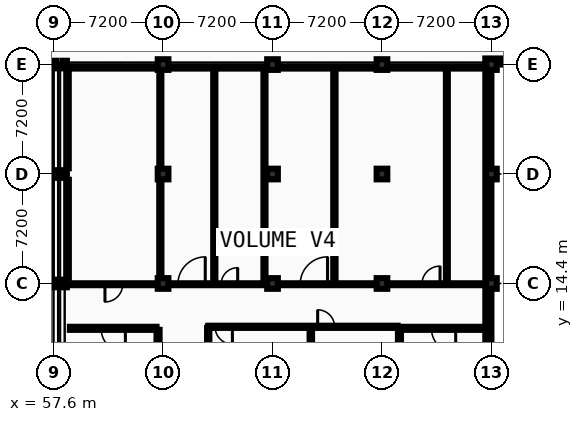
"""IFC4 building model, lengths in metres.
Left out: names, types, materials, properties, quantities, classifications, styles, units other than length and angle.
Written with IfcOpenShell. Run it as: python <this file> out.ifc"""

import sys

from ifc_helpers import new_model, si_unit, direction, frame, frame_2d, origin, origin_2d, place, context, subcontext, project, spatial, rectangle, i_section, extrude, element, fill, save


model = new_model("IFC4")
c1 = context("Model", 3, precision=1e-05, world=origin(), true_north=direction((0.0, 1.0)))
c2 = subcontext(c1, "Body", "Model", "MODEL_VIEW")
j1 = project(units=[si_unit("LENGTHUNIT", "METRE"), si_unit("PLANEANGLEUNIT", "RADIAN")], contexts=[c1])
p1 = place(None, origin())
s1 = spatial("IfcSite", under=j1, at=p1, CompositionType="ELEMENT")
p2 = place(p1, origin())
s2 = spatial("IfcBuilding", under=s1, at=p2, CompositionType="ELEMENT")
p3 = place(p2, frame((0.0, 0.0, -4.8)))
s3 = spatial("IfcBuildingStorey", under=s2, at=p3, CompositionType="ELEMENT", Elevation=-4.8)
for number, where, z_axis, x_axis in (
    (1, (57.6, 14.4, 0.0), (0.0, 0.0, 1.0), (1.0, 0.0, 0.0)),
    (2, (57.6, 21.6, 0.0), (0.0, 0.0, 1.0), (1.0, 0.0, 0.0)),
    (3, (57.6, 28.8, 0.0), (0.0, 0.0, 1.0), (1.0, 0.0, 0.0)),
    (4, (58.32, 14.4, 0.0), (0.0, 0.0, 1.0), (1.0, 0.0, 0.0)),
    (5, (58.32, 21.6, 0.0), (0.0, 0.0, 1.0), (1.0, 0.0, 0.0)),
    (6, (58.32, 28.8, 0.0), (0.0, 0.0, 1.0), (1.0, 0.0, 0.0)),
):
    element("IfcColumn", number, at=place(p3, frame(where, z_axis=z_axis, x_axis=x_axis)), inside=s3, PredefinedType="COLUMN", context=c2, shape_type="SweptSolid", body=[
        extrude(i_section(OverallWidth=0.3, OverallDepth=0.5, WebThickness=0.014, FlangeThickness=0.028, FilletRadius=0.027, at=origin_2d()), origin(), (0.0, 0.0, 1.0), 4.8),
    ])
for number, where, z_axis, x_axis in (
    (7, (64.8, 14.4, 0.0), (0.0, 0.0, 1.0), (1.0, 0.0, 0.0)),
    (8, (64.8, 21.6, 0.0), (0.0, 0.0, 1.0), (1.0, 0.0, 0.0)),
    (9, (64.8, 28.8, 0.0), (0.0, 0.0, 1.0), (1.0, 0.0, 0.0)),
    (10, (72.0, 14.4, 0.0), (0.0, 0.0, 1.0), (1.0, 0.0, 0.0)),
    (11, (72.0, 21.6, 0.0), (0.0, 0.0, 1.0), (1.0, 0.0, 0.0)),
    (12, (72.0, 28.8, 0.0), (0.0, 0.0, 1.0), (1.0, 0.0, 0.0)),
    (13, (79.2, 14.4, 0.0), (0.0, 0.0, 1.0), (1.0, 0.0, 0.0)),
    (14, (79.2, 21.6, 0.0), (0.0, 0.0, 1.0), (1.0, 0.0, 0.0)),
    (15, (79.2, 28.8, 0.0), (0.0, 0.0, 1.0), (1.0, 0.0, 0.0)),
    (16, (86.4, 14.4, 0.0), (0.0, 0.0, 1.0), (1.0, 0.0, 0.0)),
    (17, (86.4, 21.6, 0.0), (0.0, 0.0, 1.0), (1.0, 0.0, 0.0)),
    (18, (86.4, 28.8, 0.0), (0.0, 0.0, 1.0), (1.0, 0.0, 0.0)),
):
    element("IfcColumn", number, at=place(p3, frame(where, z_axis=z_axis, x_axis=x_axis)), inside=s3, PredefinedType="COLUMN", context=c2, shape_type="SweptSolid", body=[
        extrude(rectangle(XDim=0.7, YDim=0.7, at=origin_2d()), origin(), (0.0, 0.0, 1.0), 4.8),
    ])
p4 = place(p3, frame((86.2, 0.4, 0.0), z_axis=(0.0, 0.0, 1.0), x_axis=(0.0, 1.0, 0.0)))
e19 = element("IfcWall", 19, at=p4, inside=s3, PredefinedType="USERDEFINED", context=c2, shape_type="SweptSolid", body=[
    extrude(rectangle(XDim=28.4, YDim=0.4, at=frame_2d((14.2, 0.0))), origin(), (0.0, 0.0, 1.0), 4.545),
])
p5 = place(p3, frame((86.0, 29.0, 0.0), z_axis=(0.0, 0.0, 1.0), x_axis=(1.0, 0.0, 0.0)))
e20 = element("IfcWall", 20, at=p5, inside=s3, PredefinedType="USERDEFINED", context=c2, shape_type="SweptSolid", body=[
    extrude(rectangle(XDim=36.4, YDim=0.4, at=frame_2d((18.2, 0.0))), origin(), (0.0, 0.0, 1.0), 4.545),
])
p6 = place(p3, frame((58.67, 11.45, 0.0), z_axis=(0.0, 0.0, 1.0), x_axis=(1.0, 0.0, 0.0)))
e21 = element("IfcWall", 21, at=p6, inside=s3, PredefinedType="PARTITIONING", context=c2, shape_type="SweptSolid", body=[
    extrude(rectangle(XDim=5.7, YDim=0.2, at=frame_2d((2.85, 0.0))), origin(), (0.0, 0.0, 1.0), 4.545),
])
p7 = place(p6, frame((2.05, 0.0, 0.0)))
e22 = element("IfcOpeningElement", 22, at=p7, cuts=e21, PredefinedType="OPENING", context=c2, shape_type="SweptSolid", body=[
    extrude(rectangle(XDim=1.6, YDim=2.2, at=frame_2d((0.8, 1.1))), frame((0.0, 0.11, 0.0), z_axis=(0.0, -1.0, 0.0), x_axis=(1.0, 0.0, 0.0)), (0.0, 0.0, 1.0), 0.22),
])
p8 = place(p3, frame((64.47, 8.9, 0.0), z_axis=(0.0, 0.0, 1.0), x_axis=(0.0, 1.0, 0.0)))
e23 = element("IfcWall", 23, at=p8, inside=s3, PredefinedType="PARTITIONING", context=c2, shape_type="SweptSolid", body=[
    extrude(rectangle(XDim=2.45, YDim=0.2, at=frame_2d((1.225, 0.0))), origin(), (0.0, 0.0, 1.0), 4.545),
])
p9 = place(p3, frame((80.45, 11.45, 0.0), z_axis=(0.0, 0.0, 1.0), x_axis=(1.0, 0.0, 0.0)))
e24 = element("IfcWall", 24, at=p9, inside=s3, PredefinedType="PARTITIONING", context=c2, shape_type="SweptSolid", body=[
    extrude(rectangle(XDim=5.6, YDim=0.2, at=frame_2d((2.8, 0.0))), origin(), (0.0, 0.0, 1.0), 4.545),
])
p10 = place(p9, frame((2.0, 0.0, 0.0)))
e25 = element("IfcOpeningElement", 25, at=p10, cuts=e24, PredefinedType="OPENING", context=c2, shape_type="SweptSolid", body=[
    extrude(rectangle(XDim=1.6, YDim=2.2, at=frame_2d((0.8, 1.1))), frame((0.0, 0.11, 0.0), z_axis=(0.0, -1.0, 0.0), x_axis=(1.0, 0.0, 0.0)), (0.0, 0.0, 1.0), 0.22),
])
p11 = place(p3, frame((80.35, 8.9, 0.0), z_axis=(0.0, 0.0, 1.0), x_axis=(0.0, 1.0, 0.0)))
e26 = element("IfcWall", 26, at=p11, inside=s3, PredefinedType="PARTITIONING", context=c2, shape_type="SweptSolid", body=[
    extrude(rectangle(XDim=2.45, YDim=0.2, at=frame_2d((1.225, 0.0))), origin(), (0.0, 0.0, 1.0), 4.545),
])
p12 = place(p3, frame((67.77, 11.55, 0.0), z_axis=(0.0, 0.0, 1.0), x_axis=(1.0, 0.0, 0.0)))
e27 = element("IfcWall", 27, at=p12, inside=s3, PredefinedType="PARTITIONING", context=c2, shape_type="SweptSolid", body=[
    extrude(rectangle(XDim=12.46, YDim=0.142, at=frame_2d((6.23, 0.0))), origin(), (0.0, 0.0, 1.0), 4.545),
])
p13 = place(p12, frame((7.2, 0.0, 0.0)))
e28 = element("IfcOpeningElement", 28, at=p13, cuts=e27, PredefinedType="OPENING", context=c2, shape_type="SweptSolid", body=[
    extrude(rectangle(XDim=1.114, YDim=2.04, at=frame_2d((0.557, 1.02))), frame((0.0, 0.081, 0.0), z_axis=(0.0, -1.0, 0.0), x_axis=(1.0, 0.0, 0.0)), (0.0, 0.0, 1.0), 0.162),
])
p14 = place(p12, frame((0.45, 0.0, 0.0)))
e29 = element("IfcOpeningElement", 29, at=p14, cuts=e27, PredefinedType="OPENING", context=c2, shape_type="SweptSolid", body=[
    extrude(rectangle(XDim=1.14, YDim=2.04, at=frame_2d((0.57, 1.02))), frame((0.0, 0.081, 0.0), z_axis=(0.0, -1.0, 0.0), x_axis=(1.0, 0.0, 0.0)), (0.0, 0.0, 1.0), 0.162),
])
p15 = place(p3, frame((58.7, 14.35, 0.0), z_axis=(0.0, 0.0, 1.0), x_axis=(1.0, 0.0, 0.0)))
e30 = element("IfcWall", 30, at=p15, inside=s3, PredefinedType="PARTITIONING", context=c2, shape_type="SweptSolid", body=[
    extrude(rectangle(XDim=5.72, YDim=0.125, at=frame_2d((2.86, 0.0))), origin(), (0.0, 0.0, 1.0), 4.095),
])
p16 = place(p15, frame((2.277, 0.0, 0.0)))
e31 = element("IfcOpeningElement", 31, at=p16, cuts=e30, PredefinedType="OPENING", context=c2, shape_type="SweptSolid", body=[
    extrude(rectangle(XDim=1.166, YDim=2.04, at=frame_2d((0.583, 1.02))), frame((0.0, 0.073, 0.0), z_axis=(0.0, -1.0, 0.0), x_axis=(1.0, 0.0, 0.0)), (0.0, 0.0, 1.0), 0.145),
])
p17 = place(p3, frame((65.18, 14.35, 0.0), z_axis=(0.0, 0.0, 1.0), x_axis=(1.0, 0.0, 0.0)))
e32 = element("IfcWall", 32, at=p17, inside=s3, PredefinedType="PARTITIONING", context=c2, shape_type="SweptSolid", body=[
    extrude(rectangle(XDim=6.44, YDim=0.125, at=frame_2d((3.22, 0.0))), origin(), (0.0, 0.0, 1.0), 4.095),
])
p18 = place(p17, frame((3.44, 0.0, 0.0)))
e33 = element("IfcOpeningElement", 33, at=p18, cuts=e32, PredefinedType="OPENING", context=c2, shape_type="SweptSolid", body=[
    extrude(rectangle(XDim=1.088, YDim=2.04, at=frame_2d((0.544, 1.02))), frame((0.0, 0.073, 0.0), z_axis=(0.0, -1.0, 0.0), x_axis=(1.0, 0.0, 0.0)), (0.0, 0.0, 1.0), 0.145),
])
p19 = place(p17, frame((0.595, 0.0, 0.0)))
e34 = element("IfcOpeningElement", 34, at=p19, cuts=e32, PredefinedType="OPENING", context=c2, shape_type="SweptSolid", body=[
    extrude(rectangle(XDim=1.8, YDim=2.3, at=frame_2d((0.9, 1.15))), frame((0.0, 0.073, 0.0), z_axis=(0.0, -1.0, 0.0), x_axis=(1.0, 0.0, 0.0)), (0.0, 0.0, 1.0), 0.145),
])
p20 = place(p3, frame((72.38, 14.35, 0.0), z_axis=(0.0, 0.0, 1.0), x_axis=(1.0, 0.0, 0.0)))
e35 = element("IfcWall", 35, at=p20, inside=s3, PredefinedType="PARTITIONING", context=c2, shape_type="SweptSolid", body=[
    extrude(rectangle(XDim=6.44, YDim=0.125, at=frame_2d((3.22, 0.0))), origin(), (0.0, 0.0, 1.0), 4.095),
])
p21 = place(p20, frame((1.44, 0.0, 0.0)))
e36 = element("IfcOpeningElement", 36, at=p21, cuts=e35, PredefinedType="OPENING", context=c2, shape_type="SweptSolid", body=[
    extrude(rectangle(XDim=1.8, YDim=2.3, at=frame_2d((0.9, 1.15))), frame((0.0, 0.073, 0.0), z_axis=(0.0, -1.0, 0.0), x_axis=(1.0, 0.0, 0.0)), (0.0, 0.0, 1.0), 0.145),
])
p22 = place(p3, frame((79.58, 14.35, 0.0), z_axis=(0.0, 0.0, 1.0), x_axis=(1.0, 0.0, 0.0)))
e37 = element("IfcWall", 37, at=p22, inside=s3, PredefinedType="PARTITIONING", context=c2, shape_type="SweptSolid", body=[
    extrude(rectangle(XDim=6.4, YDim=0.125, at=frame_2d((3.2, 0.0))), origin(), (0.0, 0.0, 1.0), 4.095),
])
p23 = place(p22, frame((4.645, 0.0, 0.0)))
e38 = element("IfcOpeningElement", 38, at=p23, cuts=e37, PredefinedType="OPENING", context=c2, shape_type="SweptSolid", body=[
    extrude(rectangle(XDim=1.0, YDim=2.1, at=frame_2d((0.5, 1.05))), frame((0.0, 0.073, 0.0), z_axis=(0.0, -1.0, 0.0), x_axis=(1.0, 0.0, 0.0)), (0.0, 0.0, 1.0), 0.145),
])
p24 = place(p22, frame((2.248, 0.0, 0.0)))
e39 = element("IfcOpeningElement", 39, at=p24, cuts=e37, PredefinedType="OPENING", context=c2, shape_type="SweptSolid", body=[
    extrude(rectangle(XDim=1.192, YDim=2.04, at=frame_2d((0.596, 1.02))), frame((0.0, 0.073, 0.0), z_axis=(0.0, -1.0, 0.0), x_axis=(1.0, 0.0, 0.0)), (0.0, 0.0, 1.0), 0.145),
])
p25 = place(p3, frame((58.7, 28.6, 0.0), z_axis=(0.0, 0.0, 1.0), x_axis=(1.0, 0.0, 0.0)))
e40 = element("IfcWall", 40, at=p25, inside=s3, PredefinedType="PARTITIONING", context=c2, shape_type="SweptSolid", body=[
    extrude(rectangle(XDim=5.72, YDim=0.125, at=frame_2d((2.86, 0.0))), origin(), (0.0, 0.0, 1.0), 4.095),
])
for number, where, z_axis, x_axis in (
    (41, (65.18, 28.6, 0.0), (0.0, 0.0, 1.0), (1.0, 0.0, 0.0)),
    (42, (72.38, 28.6, 0.0), (0.0, 0.0, 1.0), (1.0, 0.0, 0.0)),
):
    element("IfcWall", number, at=place(p3, frame(where, z_axis=z_axis, x_axis=x_axis)), inside=s3, PredefinedType="PARTITIONING", context=c2, shape_type="SweptSolid", body=[
        extrude(rectangle(XDim=6.44, YDim=0.125, at=frame_2d((3.22, 0.0))), origin(), (0.0, 0.0, 1.0), 4.095),
    ])
p26 = place(p3, frame((79.58, 28.6, 0.0), z_axis=(0.0, 0.0, 1.0), x_axis=(1.0, 0.0, 0.0)))
e43 = element("IfcWall", 43, at=p26, inside=s3, PredefinedType="PARTITIONING", context=c2, shape_type="SweptSolid", body=[
    extrude(rectangle(XDim=6.4, YDim=0.125, at=frame_2d((3.2, 0.0))), origin(), (0.0, 0.0, 1.0), 4.095),
])
p27 = place(p3, frame((58.52, 14.78, 0.0), z_axis=(0.0, 0.0, 1.0), x_axis=(0.0, 1.0, 0.0)))
e44 = element("IfcWall", 44, at=p27, inside=s3, PredefinedType="PARTITIONING", context=c2, shape_type="SweptSolid", body=[
    extrude(rectangle(XDim=6.44, YDim=0.16, at=frame_2d((3.22, 0.0))), origin(), (0.0, 0.0, 1.0), 4.245),
])
p28 = place(p3, frame((58.52, 21.98, 0.0), z_axis=(0.0, 0.0, 1.0), x_axis=(0.0, 1.0, 0.0)))
e45 = element("IfcWall", 45, at=p28, inside=s3, PredefinedType="PARTITIONING", context=c2, shape_type="SweptSolid", body=[
    extrude(rectangle(XDim=6.44, YDim=0.15, at=frame_2d((3.22, 0.0))), origin(), (0.0, 0.0, 1.0), 4.245),
])
p29 = place(p3, frame((64.62, 14.78, 0.0), z_axis=(0.0, 0.0, 1.0), x_axis=(0.0, 1.0, 0.0)))
e46 = element("IfcWall", 46, at=p29, inside=s3, PredefinedType="PARTITIONING", context=c2, shape_type="SweptSolid", body=[
    extrude(rectangle(XDim=6.44, YDim=0.142, at=frame_2d((3.22, 0.0))), origin(), (0.0, 0.0, 1.0), 4.245),
])
p30 = place(p3, frame((64.62, 21.98, 0.0), z_axis=(0.0, 0.0, 1.0), x_axis=(0.0, 1.0, 0.0)))
e47 = element("IfcWall", 47, at=p30, inside=s3, PredefinedType="PARTITIONING", context=c2, shape_type="SweptSolid", body=[
    extrude(rectangle(XDim=6.44, YDim=0.135, at=frame_2d((3.22, 0.0))), origin(), (0.0, 0.0, 1.0), 4.245),
])
p31 = place(p3, frame((67.77, 3.36, 0.0), z_axis=(0.0, 0.0, 1.0), x_axis=(0.0, 1.0, 0.0)))
e48 = element("IfcWall", 48, at=p31, inside=s3, PredefinedType="PARTITIONING", context=c2, shape_type="SweptSolid", body=[
    extrude(rectangle(XDim=8.119, YDim=0.15, at=frame_2d((4.06, 0.0))), origin(), (0.0, 0.0, 1.0), 4.545),
])
p32 = place(p3, frame((68.17, 14.413, 0.0), z_axis=(0.0, 0.0, 1.0), x_axis=(0.0, 1.0, 0.0)))
e49 = element("IfcWall", 49, at=p32, inside=s3, PredefinedType="PARTITIONING", context=c2, shape_type="SweptSolid", body=[
    extrude(rectangle(XDim=14.125, YDim=0.142, at=frame_2d((7.062, 0.0))), origin(), (0.0, 0.0, 1.0), 4.545),
])
p33 = place(p3, frame((71.47, 14.413, 0.0), z_axis=(0.0, 0.0, 1.0), x_axis=(0.0, 1.0, 0.0)))
e50 = element("IfcWall", 50, at=p33, inside=s3, PredefinedType="PARTITIONING", context=c2, shape_type="SweptSolid", body=[
    extrude(rectangle(XDim=14.125, YDim=0.135, at=frame_2d((7.062, 0.0))), origin(), (0.0, 0.0, 1.0), 4.545),
])
p34 = place(p3, frame((74.52, 0.4, 0.0), z_axis=(0.0, 0.0, 1.0), x_axis=(0.0, 1.0, 0.0)))
e51 = element("IfcWall", 51, at=p34, inside=s3, PredefinedType="PARTITIONING", context=c2, shape_type="SweptSolid", body=[
    extrude(rectangle(XDim=11.079, YDim=0.16, at=frame_2d((5.54, 0.0))), origin(), (0.0, 0.0, 1.0), 4.235),
])
p35 = place(p3, frame((76.07, 14.413, 0.0), z_axis=(0.0, 0.0, 1.0), x_axis=(0.0, 1.0, 0.0)))
e52 = element("IfcWall", 52, at=p35, inside=s3, PredefinedType="PARTITIONING", context=c2, shape_type="SweptSolid", body=[
    extrude(rectangle(XDim=14.125, YDim=0.15, at=frame_2d((7.062, 0.0))), origin(), (0.0, 0.0, 1.0), 4.545),
])
p36 = place(p3, frame((83.47, 14.413, 0.0), z_axis=(0.0, 0.0, 1.0), x_axis=(0.0, 1.0, 0.0)))
e53 = element("IfcWall", 53, at=p36, inside=s3, PredefinedType="PARTITIONING", context=c2, shape_type="SweptSolid", body=[
    extrude(rectangle(XDim=14.125, YDim=0.125, at=frame_2d((7.062, 0.0))), origin(), (0.0, 0.0, 1.0), 4.545),
])
p37 = place(p7, origin())
e54 = element("IfcDoor", 54, at=p37, inside=s3, OperationType="DOUBLE_DOOR_SINGLE_SWING", PredefinedType="DOOR", context=c2, shape_type="SweptSolid", body=[
    extrude(rectangle(XDim=1.6, YDim=2.2, at=frame_2d((0.8, 1.1))), frame((0.0, 0.025, 0.0), z_axis=(0.0, -1.0, 0.0), x_axis=(1.0, 0.0, 0.0)), (0.0, 0.0, 1.0), 0.05),
])
fill(e22, e54)
p38 = place(p10, origin())
e55 = element("IfcDoor", 55, at=p38, inside=s3, OperationType="DOUBLE_DOOR_SINGLE_SWING", PredefinedType="DOOR", context=c2, shape_type="SweptSolid", body=[
    extrude(rectangle(XDim=1.6, YDim=2.2, at=frame_2d((0.8, 1.1))), frame((0.0, 0.025, 0.0), z_axis=(0.0, -1.0, 0.0), x_axis=(1.0, 0.0, 0.0)), (0.0, 0.0, 1.0), 0.05),
])
fill(e25, e55)
p39 = place(p23, frame((1.0, 0.0, 0.0), z_axis=(0.0, 0.0, 1.0), x_axis=(-1.0, 0.0, 0.0)))
e56 = element("IfcDoor", 56, at=p39, inside=s3, OperationType="SLIDING_TO_LEFT", PredefinedType="DOOR", context=c2, shape_type="SweptSolid", body=[
    extrude(rectangle(XDim=1.0, YDim=2.1, at=frame_2d((0.5, 1.05))), frame((0.0, 0.025, 0.0), z_axis=(0.0, -1.0, 0.0), x_axis=(1.0, 0.0, 0.0)), (0.0, 0.0, 1.0), 0.05),
])
fill(e38, e56)
p40 = place(p18, frame((1.088, 0.0, 0.0), z_axis=(0.0, 0.0, 1.0), x_axis=(-1.0, 0.0, 0.0)))
e57 = element("IfcDoor", 57, at=p40, inside=s3, OperationType="SINGLE_SWING_RIGHT", PredefinedType="DOOR", context=c2, shape_type="SweptSolid", body=[
    extrude(rectangle(XDim=1.088, YDim=2.04, at=frame_2d((0.544, 1.02))), frame((0.0, 0.025, 0.0), z_axis=(0.0, -1.0, 0.0), x_axis=(1.0, 0.0, 0.0)), (0.0, 0.0, 1.0), 0.05),
])
fill(e33, e57)
p41 = place(p19, frame((1.8, 0.0, 0.0), z_axis=(0.0, 0.0, 1.0), x_axis=(-1.0, 0.0, 0.0)))
e58 = element("IfcDoor", 58, at=p41, inside=s3, OperationType="DOUBLE_DOOR_SINGLE_SWING", PredefinedType="DOOR", context=c2, shape_type="SweptSolid", body=[
    extrude(rectangle(XDim=1.8, YDim=2.3, at=frame_2d((0.9, 1.15))), frame((0.0, 0.025, 0.0), z_axis=(0.0, -1.0, 0.0), x_axis=(1.0, 0.0, 0.0)), (0.0, 0.0, 1.0), 0.05),
])
fill(e34, e58)
p42 = place(p21, frame((1.8, 0.0, 0.0), z_axis=(0.0, 0.0, 1.0), x_axis=(-1.0, 0.0, 0.0)))
e59 = element("IfcDoor", 59, at=p42, inside=s3, OperationType="DOUBLE_DOOR_SINGLE_SWING", PredefinedType="DOOR", context=c2, shape_type="SweptSolid", body=[
    extrude(rectangle(XDim=1.8, YDim=2.3, at=frame_2d((0.9, 1.15))), frame((0.0, 0.025, 0.0), z_axis=(0.0, -1.0, 0.0), x_axis=(1.0, 0.0, 0.0)), (0.0, 0.0, 1.0), 0.05),
])
fill(e36, e59)
p43 = place(p13, origin())
e60 = element("IfcDoor", 60, at=p43, inside=s3, OperationType="SINGLE_SWING_LEFT", PredefinedType="DOOR", context=c2, shape_type="SweptSolid", body=[
    extrude(rectangle(XDim=1.114, YDim=2.04, at=frame_2d((0.557, 1.02))), frame((0.0, 0.025, 0.0), z_axis=(0.0, -1.0, 0.0), x_axis=(1.0, 0.0, 0.0)), (0.0, 0.0, 1.0), 0.05),
])
fill(e28, e60)
p44 = place(p14, origin())
e61 = element("IfcDoor", 61, at=p44, inside=s3, OperationType="SINGLE_SWING_RIGHT", PredefinedType="DOOR", context=c2, shape_type="SweptSolid", body=[
    extrude(rectangle(XDim=1.14, YDim=2.04, at=frame_2d((0.57, 1.02))), frame((0.0, 0.025, 0.0), z_axis=(0.0, -1.0, 0.0), x_axis=(1.0, 0.0, 0.0)), (0.0, 0.0, 1.0), 0.05),
])
fill(e29, e61)
p45 = place(p16, frame((1.166, 0.0, 0.0), z_axis=(0.0, 0.0, 1.0), x_axis=(-1.0, 0.0, 0.0)))
e62 = element("IfcDoor", 62, at=p45, inside=s3, OperationType="SINGLE_SWING_LEFT", PredefinedType="DOOR", context=c2, shape_type="SweptSolid", body=[
    extrude(rectangle(XDim=1.166, YDim=2.04, at=frame_2d((0.583, 1.02))), frame((0.0, 0.025, 0.0), z_axis=(0.0, -1.0, 0.0), x_axis=(1.0, 0.0, 0.0)), (0.0, 0.0, 1.0), 0.05),
])
fill(e31, e62)
p46 = place(p24, frame((1.192, 0.0, 0.0), z_axis=(0.0, 0.0, 1.0), x_axis=(-1.0, 0.0, 0.0)))
e63 = element("IfcDoor", 63, at=p46, inside=s3, OperationType="SINGLE_SWING_RIGHT", PredefinedType="DOOR", context=c2, shape_type="SweptSolid", body=[
    extrude(rectangle(XDim=1.192, YDim=2.04, at=frame_2d((0.596, 1.02))), frame((0.0, 0.025, 0.0), z_axis=(0.0, -1.0, 0.0), x_axis=(1.0, 0.0, 0.0)), (0.0, 0.0, 1.0), 0.05),
])
fill(e39, e63)
save(model, sys.argv[1])
